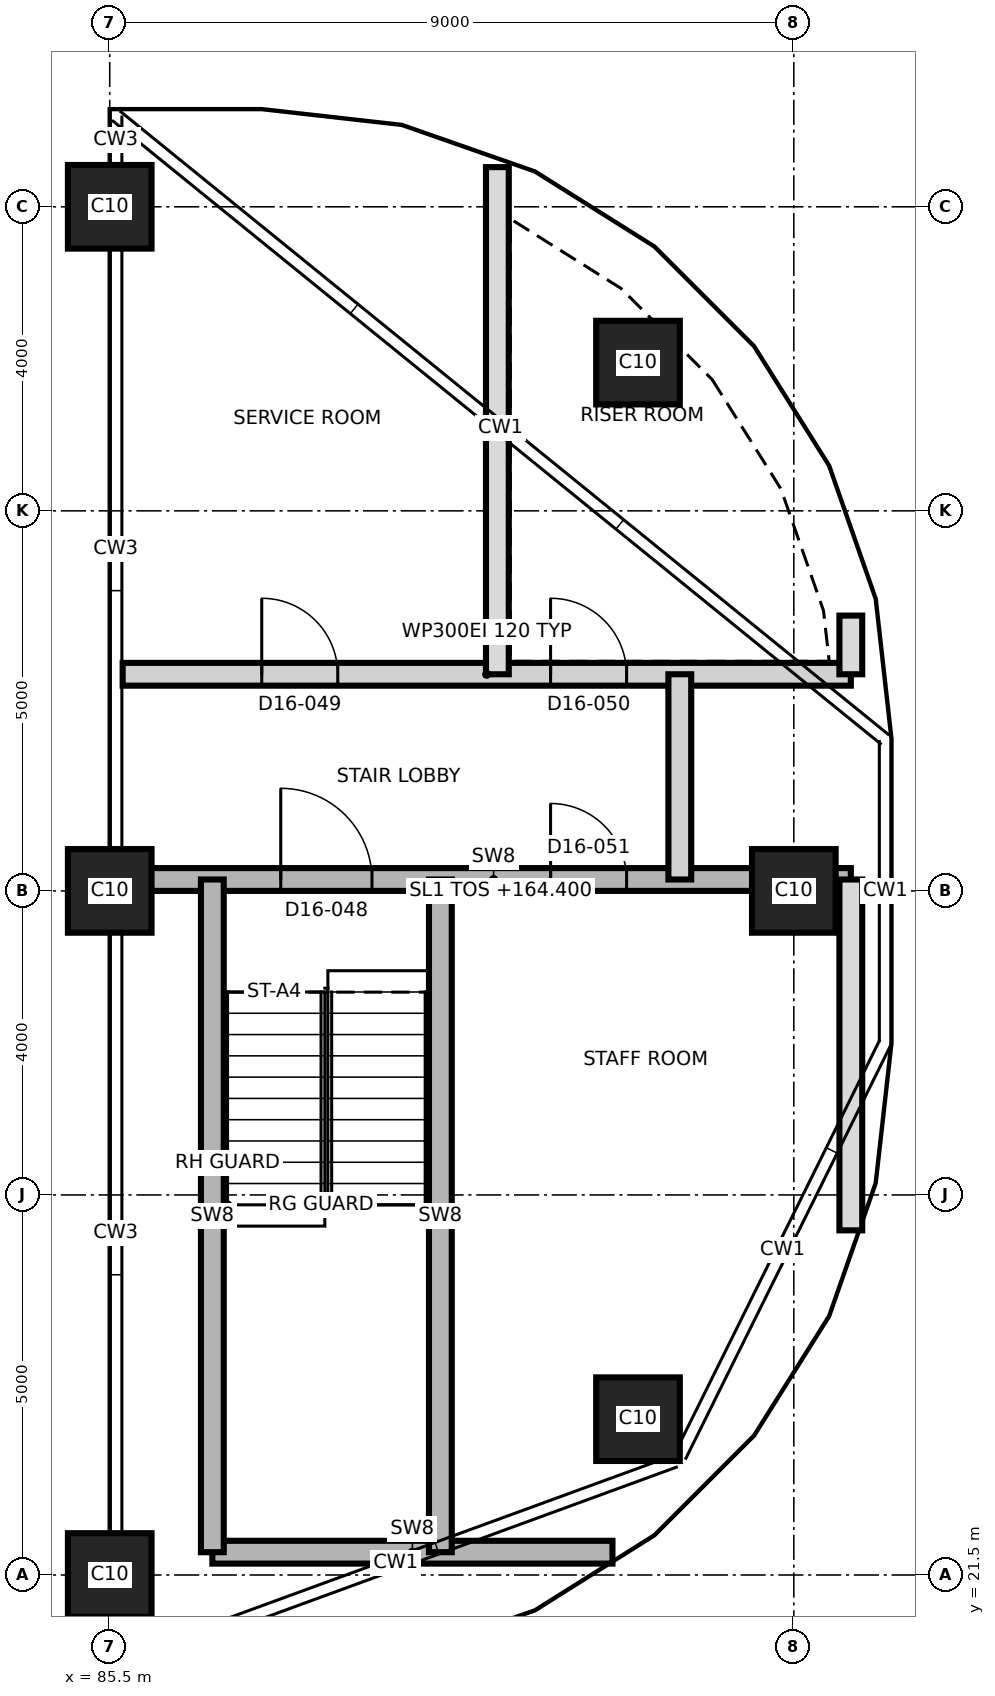
"""IFC4 building model, lengths in metres.
Left out: names, types, materials, properties, quantities, classifications, styles, units other than length and angle.
Written with IfcOpenShell. Run it as: python <this file> out.ifc"""

import sys

from ifc_helpers import new_model, si_unit, direction, frame, frame_2d, origin, origin_2d, place, context, subcontext, project, spatial, rectangle, extrude, element, fill, save


model = new_model("IFC4")
c1 = context("Model", 3, precision=1e-05, world=origin(), true_north=direction((0.0, 1.0)))
c2 = subcontext(c1, "Body", "Model", "MODEL_VIEW")
j1 = project(units=[si_unit("LENGTHUNIT", "METRE"), si_unit("PLANEANGLEUNIT", "RADIAN")], contexts=[c1])
p1 = place(None, origin())
s1 = spatial("IfcSite", under=j1, at=p1, CompositionType="ELEMENT")
p2 = place(p1, origin())
s2 = spatial("IfcBuilding", under=s1, at=p2, CompositionType="ELEMENT")
p3 = place(p2, frame((0.0, 0.0, 164.4)))
s3 = spatial("IfcBuildingStorey", under=s2, at=p3, CompositionType="ELEMENT", Elevation=164.4)
for number, where, z_axis, x_axis in (
    (1, (85.5, 21.5, 0.0), (0.0, 0.0, 1.0), (1.0, 0.0, 0.0)),
    (2, (92.45, 23.55, 0.0), (0.0, 0.0, 1.0), (1.0, 0.0, 0.0)),
    (3, (85.5, 30.5, 0.0), (0.0, 0.0, 1.0), (1.0, 0.0, 0.0)),
    (4, (94.5, 30.5, 0.0), (0.0, 0.0, 1.0), (1.0, 0.0, 0.0)),
    (5, (92.45, 37.45, 0.0), (0.0, 0.0, 1.0), (1.0, 0.0, 0.0)),
    (6, (85.5, 39.5, 0.0), (0.0, 0.0, 1.0), (1.0, 0.0, 0.0)),
):
    element("IfcColumn", number, at=place(p3, frame(where, z_axis=z_axis, x_axis=x_axis)), inside=s3, PredefinedType="COLUMN", context=c2, shape_type="SweptSolid", body=[
        extrude(rectangle(XDim=1.1, YDim=1.1, at=origin_2d()), origin(), (0.0, 0.0, 1.0), 3.7),
    ])
p4 = place(p3, frame((86.85, 21.8, 0.0), z_axis=(0.0, 0.0, 1.0), x_axis=(1.0, 0.0, 0.0)))
e7 = element("IfcWall", 7, at=p4, inside=s3, PredefinedType="SHEAR", context=c2, shape_type="SweptSolid", body=[
    extrude(rectangle(XDim=5.264, YDim=0.3, at=frame_2d((2.632, 0.0))), origin(), (0.0, 0.0, 1.0), 3.4),
])
p5 = place(p3, frame((85.85, 30.65, 0.0), z_axis=(0.0, 0.0, 1.0), x_axis=(1.0, 0.0, 0.0)))
e8 = element("IfcWall", 8, at=p5, inside=s3, PredefinedType="SHEAR", context=c2, shape_type="SweptSolid", body=[
    extrude(rectangle(XDim=9.4, YDim=0.3, at=frame_2d((4.7, 0.0))), origin(), (0.0, 0.0, 1.0), 3.4),
])
p6 = place(p5, frame((1.9, 0.0, 0.0)))
e9 = element("IfcOpeningElement", 9, at=p6, cuts=e8, PredefinedType="OPENING", context=c2, shape_type="SweptSolid", body=[
    extrude(rectangle(XDim=1.2, YDim=2.1, at=frame_2d((0.6, 1.05))), frame((0.0, 0.16, 0.0), z_axis=(0.0, -1.0, 0.0), x_axis=(1.0, 0.0, 0.0)), (0.0, 0.0, 1.0), 0.32),
])
p7 = place(p5, frame((5.45, 0.0, 0.0)))
e10 = element("IfcOpeningElement", 10, at=p7, cuts=e8, PredefinedType="OPENING", context=c2, shape_type="SweptSolid", body=[
    extrude(rectangle(XDim=1.0, YDim=2.1, at=frame_2d((0.5, 1.05))), frame((0.0, 0.16, 0.0), z_axis=(0.0, -1.0, 0.0), x_axis=(1.0, 0.0, 0.0)), (0.0, 0.0, 1.0), 0.32),
])
p8 = place(p3, frame((85.67, 33.35, 0.0), z_axis=(0.0, 0.0, 1.0), x_axis=(1.0, 0.0, 0.0)))
e11 = element("IfcWall", 11, at=p8, inside=s3, PredefinedType="PARTITIONING", context=c2, shape_type="SweptSolid", body=[
    extrude(rectangle(XDim=9.58, YDim=0.3, at=frame_2d((4.79, 0.0))), origin(), (0.0, 0.0, 1.0), 3.4),
])
p9 = place(p8, frame((1.83, 0.0, 0.0)))
e12 = element("IfcOpeningElement", 12, at=p9, cuts=e11, PredefinedType="OPENING", context=c2, shape_type="SweptSolid", body=[
    extrude(rectangle(XDim=1.0, YDim=2.1, at=frame_2d((0.5, 1.05))), frame((0.0, 0.16, 0.0), z_axis=(0.0, -1.0, 0.0), x_axis=(1.0, 0.0, 0.0)), (0.0, 0.0, 1.0), 0.32),
])
p10 = place(p8, frame((5.63, 0.0, 0.0)))
e13 = element("IfcOpeningElement", 13, at=p10, cuts=e11, PredefinedType="OPENING", context=c2, shape_type="SweptSolid", body=[
    extrude(rectangle(XDim=1.0, YDim=2.1, at=frame_2d((0.5, 1.05))), frame((0.0, 0.16, 0.0), z_axis=(0.0, -1.0, 0.0), x_axis=(1.0, 0.0, 0.0)), (0.0, 0.0, 1.0), 0.32),
])
for number, where, z_axis, x_axis in (
    (14, (86.85, 21.8, 0.0), (0.0, 0.0, 1.0), (0.0, 1.0, 0.0)),
    (15, (89.85, 21.8, 0.0), (0.0, 0.0, 1.0), (0.0, 1.0, 0.0)),
):
    element("IfcWall", number, at=place(p3, frame(where, z_axis=z_axis, x_axis=x_axis)), inside=s3, PredefinedType="SHEAR", context=c2, shape_type="SweptSolid", body=[
        extrude(rectangle(XDim=8.85, YDim=0.3, at=frame_2d((4.425, 0.0))), origin(), (0.0, 0.0, 1.0), 3.4),
    ])
p11 = place(p3, frame((90.6, 33.35, 0.0), z_axis=(0.0, 0.0, 1.0), x_axis=(0.0, 1.0, 0.0)))
e16 = element("IfcWall", 16, at=p11, inside=s3, PredefinedType="PARTITIONING", context=c2, shape_type="SweptSolid", body=[
    extrude(rectangle(XDim=6.672, YDim=0.3, at=frame_2d((3.336, 0.0))), origin(), (0.0, 0.0, 1.0), 3.4),
])
p12 = place(p3, frame((93.0, 30.65, 0.0), z_axis=(0.0, 0.0, 1.0), x_axis=(0.0, 1.0, 0.0)))
e17 = element("IfcWall", 17, at=p12, inside=s3, PredefinedType="PARTITIONING", context=c2, shape_type="SweptSolid", body=[
    extrude(rectangle(XDim=2.7, YDim=0.3, at=frame_2d((1.35, 0.0))), origin(), (0.0, 0.0, 1.0), 3.4),
])
p13 = place(p3, frame((95.25, 26.034, 0.0), z_axis=(0.0, 0.0, 1.0), x_axis=(0.0, 1.0, 0.0)))
e18 = element("IfcWall", 18, at=p13, inside=s3, PredefinedType="PARTITIONING", context=c2, shape_type="SweptSolid", body=[
    extrude(rectangle(XDim=4.616, YDim=0.3, at=frame_2d((2.308, 0.0))), origin(), (0.0, 0.0, 1.0), 3.4),
])
p14 = place(p3, frame((95.25, 33.35, 0.0), z_axis=(0.0, 0.0, 1.0), x_axis=(0.0, 1.0, 0.0)))
e19 = element("IfcWall", 19, at=p14, inside=s3, PredefinedType="PARTITIONING", context=c2, shape_type="SweptSolid", body=[
    extrude(rectangle(XDim=0.772, YDim=0.3, at=frame_2d((0.386, 0.0))), origin(), (0.0, 0.0, 1.0), 3.4),
])
p15 = place(p6, origin())
e20 = element("IfcDoor", 20, at=p15, inside=s3, OperationType="SINGLE_SWING_LEFT", PredefinedType="DOOR", context=c2, shape_type="SweptSolid", body=[
    extrude(rectangle(XDim=1.2, YDim=2.1, at=frame_2d((0.6, 1.05))), frame((0.0, 0.025, 0.0), z_axis=(0.0, -1.0, 0.0), x_axis=(1.0, 0.0, 0.0)), (0.0, 0.0, 1.0), 0.05),
])
fill(e9, e20)
p16 = place(p9, origin())
e21 = element("IfcDoor", 21, at=p16, inside=s3, OperationType="SINGLE_SWING_LEFT", PredefinedType="DOOR", context=c2, shape_type="SweptSolid", body=[
    extrude(rectangle(XDim=1.0, YDim=2.1, at=frame_2d((0.5, 1.05))), frame((0.0, 0.025, 0.0), z_axis=(0.0, -1.0, 0.0), x_axis=(1.0, 0.0, 0.0)), (0.0, 0.0, 1.0), 0.05),
])
fill(e12, e21)
p17 = place(p10, origin())
e22 = element("IfcDoor", 22, at=p17, inside=s3, OperationType="SINGLE_SWING_RIGHT", PredefinedType="DOOR", context=c2, shape_type="SweptSolid", body=[
    extrude(rectangle(XDim=1.0, YDim=2.1, at=frame_2d((0.5, 1.05))), frame((0.0, 0.025, 0.0), z_axis=(0.0, -1.0, 0.0), x_axis=(1.0, 0.0, 0.0)), (0.0, 0.0, 1.0), 0.05),
])
fill(e13, e22)
p18 = place(p7, origin())
e23 = element("IfcDoor", 23, at=p18, inside=s3, OperationType="SINGLE_SWING_LEFT", PredefinedType="DOOR", context=c2, shape_type="SweptSolid", body=[
    extrude(rectangle(XDim=1.0, YDim=2.1, at=frame_2d((0.5, 1.05))), frame((0.0, 0.025, 0.0), z_axis=(0.0, -1.0, 0.0), x_axis=(1.0, 0.0, 0.0)), (0.0, 0.0, 1.0), 0.05),
])
fill(e10, e23)
save(model, sys.argv[1])
